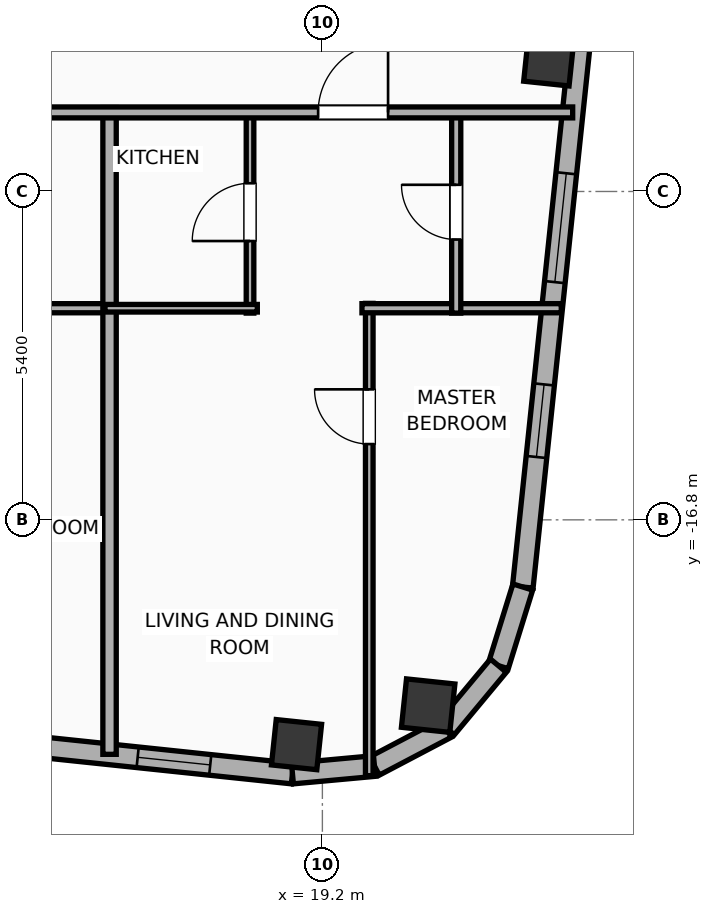
"""IFC4 building model, lengths in metres.
Left out: names, types, materials, properties, quantities, classifications, styles, units other than length and angle.
Written with IfcOpenShell. Run it as: python <this file> out.ifc"""

import sys

from ifc_helpers import new_model, si_unit, direction, frame, frame_2d, origin, origin_2d, place, context, subcontext, project, spatial, rectangle, hollow_rectangle, hollow_circle, extrude, element, fill, save


model = new_model("IFC4")
c1 = context("Model", 3, precision=1e-05, world=origin(), true_north=direction((0.0, 1.0)))
c2 = subcontext(c1, "Body", "Model", "MODEL_VIEW")
j1 = project(units=[si_unit("LENGTHUNIT", "METRE"), si_unit("PLANEANGLEUNIT", "RADIAN")], contexts=[c1])
p1 = place(None, origin())
s1 = spatial("IfcSite", under=j1, at=p1, CompositionType="ELEMENT")
p2 = place(p1, origin())
s2 = spatial("IfcBuilding", under=s1, at=p2, CompositionType="ELEMENT")
p3 = place(p2, frame((0.0, 0.0, 271.7)))
s3 = spatial("IfcBuildingStorey", under=s2, at=p3, CompositionType="ELEMENT", Elevation=271.7)
p4 = place(p3, frame((18.775, -20.497, 0.0), z_axis=(0.0, 0.0, 1.0), x_axis=(0.994521895368, -0.104528463268, 0.0)))
e1 = element("IfcColumn", 1, at=p4, inside=s3, PredefinedType="COLUMN", context=c2, shape_type="SweptSolid", body=[
    extrude(hollow_rectangle(XDim=0.75, YDim=0.75, WallThickness=0.025, at=origin_2d()), origin(), (0.0, 0.0, 1.0), 3.9),
])
p5 = place(p3, frame((20.939, -19.855, 0.0), z_axis=(0.0, 0.0, 1.0), x_axis=(0.994521895368, -0.104528463268, 0.0)))
e2 = element("IfcColumn", 2, at=p5, inside=s3, PredefinedType="COLUMN", context=c2, shape_type="SweptSolid", body=[
    extrude(hollow_circle(Radius=0.4, WallThickness=0.028, at=origin_2d()), origin(), (0.0, 0.0, 1.0), 3.9),
])
p6 = place(p3, frame((22.923, -9.252, 0.0), z_axis=(0.0, 0.0, 1.0), x_axis=(0.994521895368, -0.104528463268, 0.0)))
e3 = element("IfcColumn", 3, at=p6, inside=s3, PredefinedType="COLUMN", context=c2, shape_type="SweptSolid", body=[
    extrude(hollow_rectangle(XDim=0.75, YDim=0.75, WallThickness=0.025, at=origin_2d()), origin(), (0.0, 0.0, 1.0), 3.9),
])
p7 = place(p3, frame((18.708, -20.972, 0.0), z_axis=(0.0, 0.0, 1.0), x_axis=(-0.994521888554, 0.104528528102, 0.0)))
e4 = element("IfcWall", 4, at=p7, inside=s3, PredefinedType="ELEMENTEDWALL", context=c2, shape_type="SweptSolid", body=[
    extrude(rectangle(XDim=46.766, YDim=0.34, at=frame_2d((23.383, 0.0))), origin(), (0.0, 0.0, 1.0), 3.65),
])
p8 = place(p7, frame((23.833, 0.0, 0.75)))
e5 = element("IfcOpeningElement", 5, at=p8, cuts=e4, PredefinedType="OPENING", context=c2, shape_type="SweptSolid", body=[
    extrude(rectangle(XDim=2.4, YDim=2.1, at=frame_2d((1.2, 1.05))), frame((0.0, 0.18, 0.0), z_axis=(0.0, -1.0, 0.0), x_axis=(1.0, 0.0, 0.0)), (0.0, 0.0, 1.0), 0.36),
])
p9 = place(p7, frame((38.622, 0.0, 0.75)))
e6 = element("IfcOpeningElement", 6, at=p9, cuts=e4, PredefinedType="OPENING", context=c2, shape_type="SweptSolid", body=[
    extrude(rectangle(XDim=2.4, YDim=2.1, at=frame_2d((1.2, 1.05))), frame((0.0, 0.18, 0.0), z_axis=(0.0, -1.0, 0.0), x_axis=(1.0, 0.0, 0.0)), (0.0, 0.0, 1.0), 0.36),
])
p10 = place(p7, frame((44.402, 0.0, 0.75)))
e7 = element("IfcOpeningElement", 7, at=p10, cuts=e4, PredefinedType="OPENING", context=c2, shape_type="SweptSolid", body=[
    extrude(rectangle(XDim=1.2, YDim=2.05, at=frame_2d((0.6, 1.025))), frame((0.0, 0.18, 0.0), z_axis=(0.0, -1.0, 0.0), x_axis=(1.0, 0.0, 0.0)), (0.0, 0.0, 1.0), 0.36),
])
p11 = place(p7, frame((42.419, 0.0, 0.75)))
e8 = element("IfcOpeningElement", 8, at=p11, cuts=e4, PredefinedType="OPENING", context=c2, shape_type="SweptSolid", body=[
    extrude(rectangle(XDim=1.2, YDim=2.05, at=frame_2d((0.6, 1.025))), frame((0.0, 0.18, 0.0), z_axis=(0.0, -1.0, 0.0), x_axis=(1.0, 0.0, 0.0)), (0.0, 0.0, 1.0), 0.36),
])
p12 = place(p7, frame((34.933, 0.0, 0.75)))
e9 = element("IfcOpeningElement", 9, at=p12, cuts=e4, PredefinedType="OPENING", context=c2, shape_type="SweptSolid", body=[
    extrude(rectangle(XDim=1.2, YDim=2.05, at=frame_2d((0.6, 1.025))), frame((0.0, 0.18, 0.0), z_axis=(0.0, -1.0, 0.0), x_axis=(1.0, 0.0, 0.0)), (0.0, 0.0, 1.0), 0.36),
])
p13 = place(p7, frame((28.692, 0.0, 0.75)))
e10 = element("IfcOpeningElement", 10, at=p13, cuts=e4, PredefinedType="OPENING", context=c2, shape_type="SweptSolid", body=[
    extrude(rectangle(XDim=1.2, YDim=2.05, at=frame_2d((0.6, 1.025))), frame((0.0, 0.18, 0.0), z_axis=(0.0, -1.0, 0.0), x_axis=(1.0, 0.0, 0.0)), (0.0, 0.0, 1.0), 0.36),
])
p14 = place(p7, frame((30.957, 0.0, 0.75)))
e11 = element("IfcOpeningElement", 11, at=p14, cuts=e4, PredefinedType="OPENING", context=c2, shape_type="SweptSolid", body=[
    extrude(rectangle(XDim=1.2, YDim=2.05, at=frame_2d((0.6, 1.025))), frame((0.0, 0.18, 0.0), z_axis=(0.0, -1.0, 0.0), x_axis=(1.0, 0.0, 0.0)), (0.0, 0.0, 1.0), 0.36),
])
p15 = place(p7, frame((7.492, 0.0, 0.75)))
e12 = element("IfcOpeningElement", 12, at=p15, cuts=e4, PredefinedType="OPENING", context=c2, shape_type="SweptSolid", body=[
    extrude(rectangle(XDim=1.2, YDim=2.05, at=frame_2d((0.6, 1.025))), frame((0.0, 0.18, 0.0), z_axis=(0.0, -1.0, 0.0), x_axis=(1.0, 0.0, 0.0)), (0.0, 0.0, 1.0), 0.36),
])
p16 = place(p7, frame((4.141, 0.0, 0.75)))
e13 = element("IfcOpeningElement", 13, at=p16, cuts=e4, PredefinedType="OPENING", context=c2, shape_type="SweptSolid", body=[
    extrude(rectangle(XDim=1.2, YDim=2.05, at=frame_2d((0.6, 1.025))), frame((0.0, 0.18, 0.0), z_axis=(0.0, -1.0, 0.0), x_axis=(1.0, 0.0, 0.0)), (0.0, 0.0, 1.0), 0.36),
])
p17 = place(p7, frame((1.36, 0.0, 0.75)))
e14 = element("IfcOpeningElement", 14, at=p17, cuts=e4, PredefinedType="OPENING", context=c2, shape_type="SweptSolid", body=[
    extrude(rectangle(XDim=1.2, YDim=2.05, at=frame_2d((0.6, 1.025))), frame((0.0, 0.18, 0.0), z_axis=(0.0, -1.0, 0.0), x_axis=(1.0, 0.0, 0.0)), (0.0, 0.0, 1.0), 0.36),
])
p18 = place(p7, frame((20.254, 0.0, 0.75)))
e15 = element("IfcOpeningElement", 15, at=p18, cuts=e4, PredefinedType="OPENING", context=c2, shape_type="SweptSolid", body=[
    extrude(rectangle(XDim=1.2, YDim=2.05, at=frame_2d((0.6, 1.025))), frame((0.0, 0.18, 0.0), z_axis=(0.0, -1.0, 0.0), x_axis=(1.0, 0.0, 0.0)), (0.0, 0.0, 1.0), 0.36),
])
p19 = place(p7, frame((16.172, 0.0, 0.75)))
e16 = element("IfcOpeningElement", 16, at=p19, cuts=e4, PredefinedType="OPENING", context=c2, shape_type="SweptSolid", body=[
    extrude(rectangle(XDim=1.2, YDim=2.05, at=frame_2d((0.6, 1.025))), frame((0.0, 0.18, 0.0), z_axis=(0.0, -1.0, 0.0), x_axis=(1.0, 0.0, 0.0)), (0.0, 0.0, 1.0), 0.36),
])
p20 = place(p7, frame((12.11, 0.0, 0.75)))
e17 = element("IfcOpeningElement", 17, at=p20, cuts=e4, PredefinedType="OPENING", context=c2, shape_type="SweptSolid", body=[
    extrude(rectangle(XDim=1.2, YDim=2.05, at=frame_2d((0.6, 1.025))), frame((0.0, 0.18, 0.0), z_axis=(0.0, -1.0, 0.0), x_axis=(1.0, 0.0, 0.0)), (0.0, 0.0, 1.0), 0.36),
])
p21 = place(p3, frame((25.67, 12.296, 0.0), z_axis=(0.0, 0.0, 1.0), x_axis=(-0.104533282919, -0.994521388791, 0.0)))
e18 = element("IfcWall", 18, at=p21, inside=s3, PredefinedType="ELEMENTEDWALL", context=c2, shape_type="SweptSolid", body=[
    extrude(rectangle(XDim=30.366, YDim=0.34, at=frame_2d((15.183, 0.0))), origin(), (0.0, 0.0, 1.0), 3.65),
])
p22 = place(p21, frame((5.842, 0.0, 0.75)))
e19 = element("IfcOpeningElement", 19, at=p22, cuts=e18, PredefinedType="OPENING", context=c2, shape_type="SweptSolid", body=[
    extrude(rectangle(XDim=1.8, YDim=2.1, at=frame_2d((0.9, 1.05))), frame((0.0, 0.18, 0.0), z_axis=(0.0, -1.0, 0.0), x_axis=(1.0, 0.0, 0.0)), (0.0, 0.0, 1.0), 0.36),
])
p23 = place(p21, frame((23.525, 0.0, 0.75)))
e20 = element("IfcOpeningElement", 20, at=p23, cuts=e18, PredefinedType="OPENING", context=c2, shape_type="SweptSolid", body=[
    extrude(rectangle(XDim=1.8, YDim=2.1, at=frame_2d((0.9, 1.05))), frame((0.0, 0.18, 0.0), z_axis=(0.0, -1.0, 0.0), x_axis=(1.0, 0.0, 0.0)), (0.0, 0.0, 1.0), 0.36),
])
p24 = place(p21, frame((27.017, 0.0, 0.75)))
e21 = element("IfcOpeningElement", 21, at=p24, cuts=e18, PredefinedType="OPENING", context=c2, shape_type="SweptSolid", body=[
    extrude(rectangle(XDim=1.2, YDim=2.05, at=frame_2d((0.6, 1.025))), frame((0.0, 0.18, 0.0), z_axis=(0.0, -1.0, 0.0), x_axis=(1.0, 0.0, 0.0)), (0.0, 0.0, 1.0), 0.36),
])
p25 = place(p21, frame((17.829, 0.0, 0.75)))
e22 = element("IfcOpeningElement", 22, at=p25, cuts=e18, PredefinedType="OPENING", context=c2, shape_type="SweptSolid", body=[
    extrude(rectangle(XDim=1.2, YDim=2.05, at=frame_2d((0.6, 1.025))), frame((0.0, 0.18, 0.0), z_axis=(0.0, -1.0, 0.0), x_axis=(1.0, 0.0, 0.0)), (0.0, 0.0, 1.0), 0.36),
])
p26 = place(p3, frame((22.496, -17.905, 0.0), z_axis=(0.0, 0.0, 1.0), x_axis=(-0.296416228123, -0.955058856671, 0.0)))
e23 = element("IfcWall", 23, at=p26, inside=s3, PredefinedType="ELEMENTEDWALL", context=c2, shape_type="SweptSolid", body=[
    extrude(rectangle(XDim=1.354, YDim=0.34, at=frame_2d((0.677, 0.0))), origin(), (0.0, 0.0, 1.0), 3.65),
])
p27 = place(p3, frame((22.094, -19.198, 0.0), z_axis=(0.0, 0.0, 1.0), x_axis=(-0.639501603217, -0.768789762863, 0.0)))
e24 = element("IfcWall", 24, at=p27, inside=s3, PredefinedType="ELEMENTEDWALL", context=c2, shape_type="SweptSolid", body=[
    extrude(rectangle(XDim=1.337, YDim=0.34, at=frame_2d((0.668, 0.0))), origin(), (0.0, 0.0, 1.0), 3.65),
])
p28 = place(p3, frame((21.24, -20.226, 0.0), z_axis=(0.0, 0.0, 1.0), x_axis=(-0.884922182678, -0.465738908193, 0.0)))
e25 = element("IfcWall", 25, at=p28, inside=s3, PredefinedType="ELEMENTEDWALL", context=c2, shape_type="SweptSolid", body=[
    extrude(rectangle(XDim=1.337, YDim=0.34, at=frame_2d((0.668, 0.0))), origin(), (0.0, 0.0, 1.0), 3.65),
])
p29 = place(p3, frame((20.056, -20.848, 0.0), z_axis=(0.0, 0.0, 1.0), x_axis=(-0.995813013343, -0.091413579172, 0.0)))
e26 = element("IfcWall", 26, at=p29, inside=s3, PredefinedType="ELEMENTEDWALL", context=c2, shape_type="SweptSolid", body=[
    extrude(rectangle(XDim=1.354, YDim=0.34, at=frame_2d((0.677, 0.0))), origin(), (0.0, 0.0, 1.0), 3.65),
])
p30 = place(p3, frame((12.17, -13.32, 0.0), z_axis=(0.0, 0.0, 1.0), x_axis=(1.0, 0.0, 0.0)))
e27 = element("IfcWall", 27, at=p30, inside=s3, PredefinedType="PLUMBINGWALL", context=c2, shape_type="SweptSolid", body=[
    extrude(rectangle(XDim=3.605, YDim=0.15, at=frame_2d((1.802, 0.0))), origin(), (0.0, 0.0, 1.0), 3.65),
])
p31 = place(p3, frame((15.7, -20.656, 0.0), z_axis=(0.0, 0.0, 1.0), x_axis=(0.0, 1.0, 0.0)))
e28 = element("IfcWall", 28, at=p31, inside=s3, PredefinedType="PARTITIONING", context=c2, shape_type="SweptSolid", body=[
    extrude(rectangle(XDim=10.636, YDim=0.22, at=frame_2d((5.318, 0.0))), origin(), (0.0, 0.0, 1.0), 3.65),
])
p32 = place(p3, frame((19.971, -21.007, 0.0), z_axis=(0.0, 0.0, 1.0), x_axis=(0.0, 1.0, 0.0)))
e29 = element("IfcWall", 29, at=p32, inside=s3, PredefinedType="PARTITIONING", context=c2, shape_type="SweptSolid", body=[
    extrude(rectangle(XDim=7.767, YDim=0.125, at=frame_2d((3.883, 0.0))), origin(), (0.0, 0.0, 1.0), 3.65),
])
p33 = place(p32, frame((5.453, 0.0, 0.0)))
e30 = element("IfcOpeningElement", 30, at=p33, cuts=e29, PredefinedType="OPENING", context=c2, shape_type="SweptSolid", body=[
    extrude(rectangle(XDim=0.9, YDim=2.05, at=frame_2d((0.45, 1.025))), frame((0.0, 0.073, 0.0), z_axis=(0.0, -1.0, 0.0), x_axis=(1.0, 0.0, 0.0)), (0.0, 0.0, 1.0), 0.145),
])
p34 = place(p3, frame((19.851, -13.32, 0.0), z_axis=(0.0, 0.0, 1.0), x_axis=(1.0, 0.0, 0.0)))
e31 = element("IfcWall", 31, at=p34, inside=s3, PredefinedType="PLUMBINGWALL", context=c2, shape_type="SweptSolid", body=[
    extrude(rectangle(XDim=3.278, YDim=0.15, at=frame_2d((1.639, 0.0))), origin(), (0.0, 0.0, 1.0), 3.65),
])
p35 = place(p3, frame((18.01, -13.4, 0.0), z_axis=(0.0, 0.0, 1.0), x_axis=(0.0, 1.0, 0.0)))
e32 = element("IfcWall", 32, at=p35, inside=s3, PredefinedType="PARTITIONING", context=c2, shape_type="SweptSolid", body=[
    extrude(rectangle(XDim=3.32, YDim=0.125, at=frame_2d((1.66, 0.0))), origin(), (0.0, 0.0, 1.0), 3.65),
])
p36 = place(p35, frame((1.185, 0.0, 0.0)))
e33 = element("IfcOpeningElement", 33, at=p36, cuts=e32, PredefinedType="OPENING", context=c2, shape_type="SweptSolid", body=[
    extrude(rectangle(XDim=0.95, YDim=2.05, at=frame_2d((0.475, 1.025))), frame((0.0, 0.073, 0.0), z_axis=(0.0, -1.0, 0.0), x_axis=(1.0, 0.0, 0.0)), (0.0, 0.0, 1.0), 0.145),
])
p37 = place(p3, frame((15.625, -13.32, 0.0), z_axis=(0.0, 0.0, 1.0), x_axis=(1.0, 0.0, 0.0)))
e34 = element("IfcWall", 34, at=p37, inside=s3, PredefinedType="PARTITIONING", context=c2, shape_type="SweptSolid", body=[
    extrude(rectangle(XDim=2.505, YDim=0.125, at=frame_2d((1.252, 0.0))), origin(), (0.0, 0.0, 1.0), 3.65),
])
p38 = place(p3, frame((21.401, -13.4, 0.0), z_axis=(0.0, 0.0, 1.0), x_axis=(0.0, 1.0, 0.0)))
e35 = element("IfcWall", 35, at=p38, inside=s3, PredefinedType="PLUMBINGWALL", context=c2, shape_type="SweptSolid", body=[
    extrude(rectangle(XDim=3.32, YDim=0.15, at=frame_2d((1.66, 0.0))), origin(), (0.0, 0.0, 1.0), 3.65),
])
p39 = place(p38, frame((1.21, 0.0, 0.0)))
e36 = element("IfcOpeningElement", 36, at=p39, cuts=e35, PredefinedType="OPENING", context=c2, shape_type="SweptSolid", body=[
    extrude(rectangle(XDim=0.9, YDim=2.05, at=frame_2d((0.45, 1.025))), frame((0.0, 0.085, 0.0), z_axis=(0.0, -1.0, 0.0), x_axis=(1.0, 0.0, 0.0)), (0.0, 0.0, 1.0), 0.17),
])
p40 = place(p3, frame((8.08, -10.1, 0.0), z_axis=(0.0, 0.0, 1.0), x_axis=(1.0, 0.0, 0.0)))
e37 = element("IfcWall", 37, at=p40, inside=s3, PredefinedType="PARTITIONING", context=c2, shape_type="SweptSolid", body=[
    extrude(rectangle(XDim=15.236, YDim=0.18, at=frame_2d((7.618, 0.0))), origin(), (0.0, 0.0, 1.0), 3.65),
])
p41 = place(p40, frame((3.4, 0.0, 0.0)))
e38 = element("IfcOpeningElement", 38, at=p41, cuts=e37, PredefinedType="OPENING", context=c2, shape_type="SweptSolid", body=[
    extrude(rectangle(XDim=1.15, YDim=2.05, at=frame_2d((0.575, 1.025))), frame((0.0, 0.1, 0.0), z_axis=(0.0, -1.0, 0.0), x_axis=(1.0, 0.0, 0.0)), (0.0, 0.0, 1.0), 0.2),
])
p42 = place(p40, frame((11.05, 0.0, 0.0)))
e39 = element("IfcOpeningElement", 39, at=p42, cuts=e37, PredefinedType="OPENING", context=c2, shape_type="SweptSolid", body=[
    extrude(rectangle(XDim=1.15, YDim=2.05, at=frame_2d((0.575, 1.025))), frame((0.0, 0.1, 0.0), z_axis=(0.0, -1.0, 0.0), x_axis=(1.0, 0.0, 0.0)), (0.0, 0.0, 1.0), 0.2),
])
p43 = place(p23, origin())
e40 = element("IfcWindow", 40, at=p43, inside=s3, PartitioningType="SINGLE_PANEL", PredefinedType="WINDOW", context=c2, shape_type="SweptSolid", body=[
    extrude(rectangle(XDim=1.8, YDim=2.1, at=frame_2d((0.9, 1.05))), frame((0.0, 0.03, 0.0), z_axis=(0.0, -1.0, 0.0), x_axis=(1.0, 0.0, 0.0)), (0.0, 0.0, 1.0), 0.06),
])
fill(e20, e40)
p44 = place(p17, origin())
e41 = element("IfcWindow", 41, at=p44, inside=s3, PartitioningType="SINGLE_PANEL", PredefinedType="WINDOW", context=c2, shape_type="SweptSolid", body=[
    extrude(rectangle(XDim=1.2, YDim=2.05, at=frame_2d((0.6, 1.025))), frame((0.0, 0.03, 0.0), z_axis=(0.0, -1.0, 0.0), x_axis=(1.0, 0.0, 0.0)), (0.0, 0.0, 1.0), 0.06),
])
fill(e14, e41)
p45 = place(p24, origin())
e42 = element("IfcWindow", 42, at=p45, inside=s3, PartitioningType="SINGLE_PANEL", PredefinedType="WINDOW", context=c2, shape_type="SweptSolid", body=[
    extrude(rectangle(XDim=1.2, YDim=2.05, at=frame_2d((0.6, 1.025))), frame((0.0, 0.03, 0.0), z_axis=(0.0, -1.0, 0.0), x_axis=(1.0, 0.0, 0.0)), (0.0, 0.0, 1.0), 0.06),
])
fill(e21, e42)
p46 = place(p33, origin())
e43 = element("IfcDoor", 43, at=p46, inside=s3, OperationType="SINGLE_SWING_RIGHT", PredefinedType="DOOR", context=c2, shape_type="SweptSolid", body=[
    extrude(rectangle(XDim=0.9, YDim=2.05, at=frame_2d((0.45, 1.025))), frame((0.0, 0.025, 0.0), z_axis=(0.0, -1.0, 0.0), x_axis=(1.0, 0.0, 0.0)), (0.0, 0.0, 1.0), 0.05),
])
fill(e30, e43)
p47 = place(p36, origin())
e44 = element("IfcDoor", 44, at=p47, inside=s3, OperationType="SINGLE_SWING_LEFT", PredefinedType="DOOR", context=c2, shape_type="SweptSolid", body=[
    extrude(rectangle(XDim=0.95, YDim=2.05, at=frame_2d((0.475, 1.025))), frame((0.0, 0.025, 0.0), z_axis=(0.0, -1.0, 0.0), x_axis=(1.0, 0.0, 0.0)), (0.0, 0.0, 1.0), 0.05),
])
fill(e33, e44)
p48 = place(p39, origin())
e45 = element("IfcDoor", 45, at=p48, inside=s3, OperationType="SINGLE_SWING_RIGHT", PredefinedType="DOOR", context=c2, shape_type="SweptSolid", body=[
    extrude(rectangle(XDim=0.9, YDim=2.05, at=frame_2d((0.45, 1.025))), frame((0.0, 0.025, 0.0), z_axis=(0.0, -1.0, 0.0), x_axis=(1.0, 0.0, 0.0)), (0.0, 0.0, 1.0), 0.05),
])
fill(e36, e45)
p49 = place(p42, origin())
e46 = element("IfcDoor", 46, at=p49, inside=s3, OperationType="SINGLE_SWING_RIGHT", PredefinedType="DOOR", context=c2, shape_type="SweptSolid", body=[
    extrude(rectangle(XDim=1.15, YDim=2.05, at=frame_2d((0.575, 1.025))), frame((0.0, 0.025, 0.0), z_axis=(0.0, -1.0, 0.0), x_axis=(1.0, 0.0, 0.0)), (0.0, 0.0, 1.0), 0.05),
])
fill(e39, e46)
save(model, sys.argv[1])
